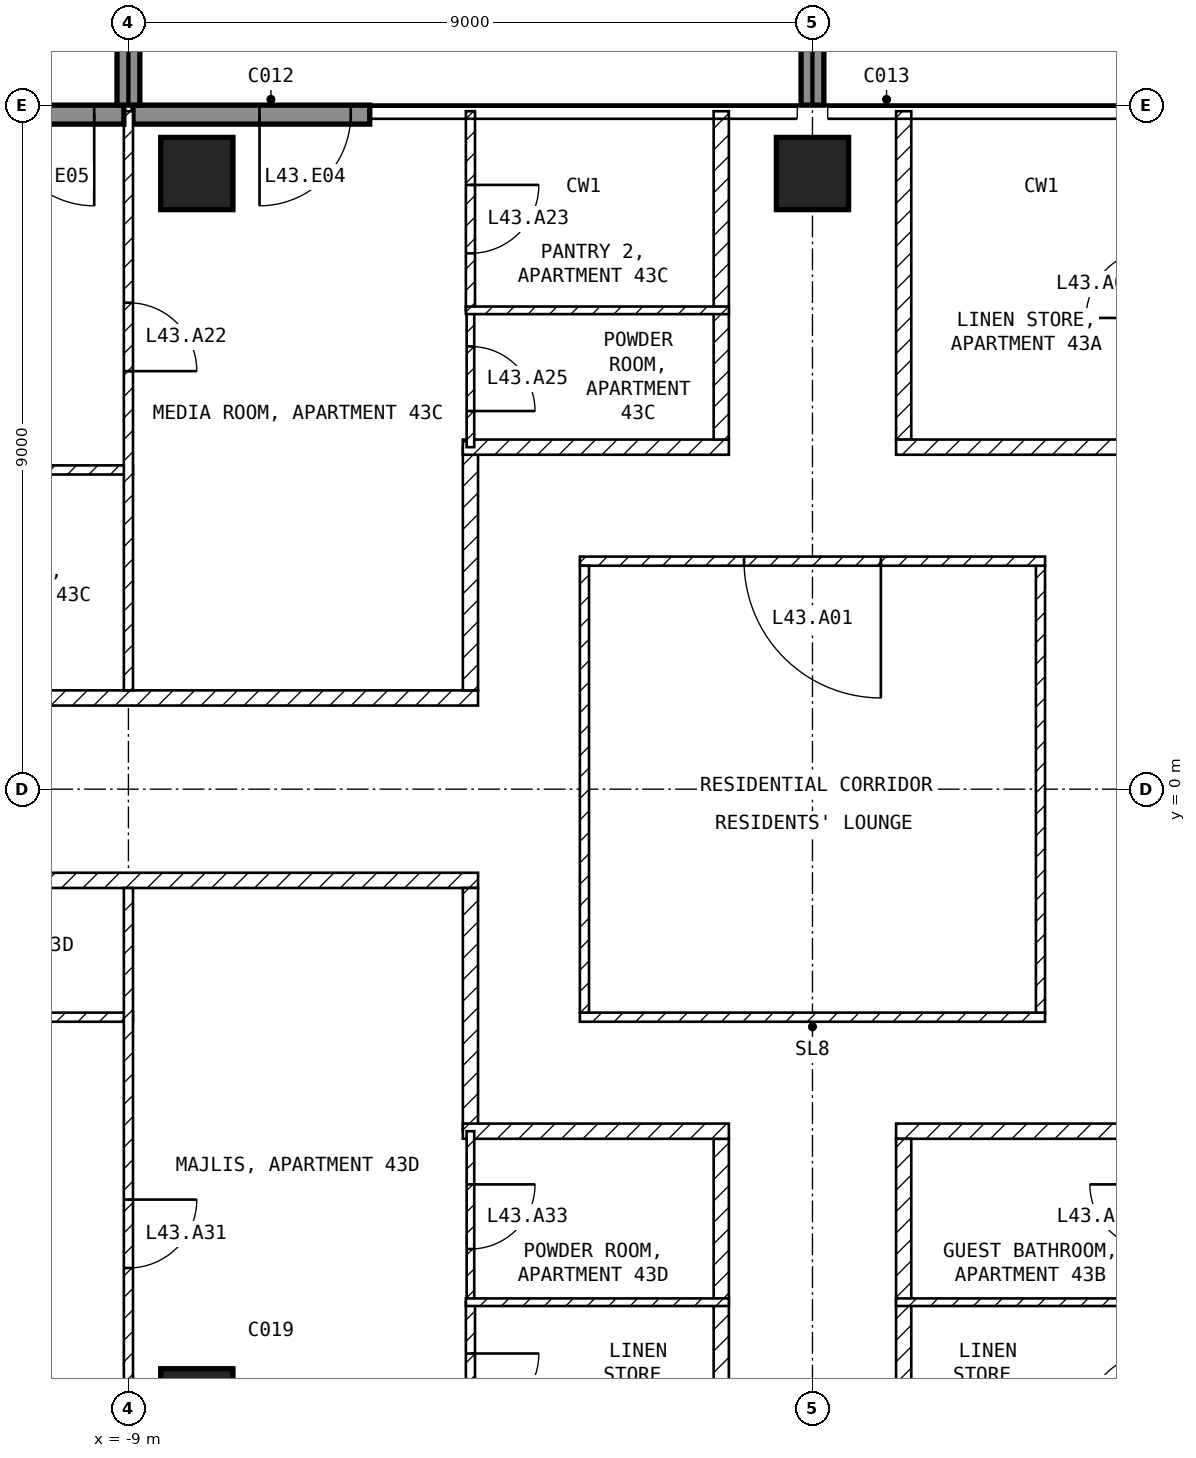
"""IFC4 building model, lengths in metres.
Left out: names, types, materials, properties, quantities, classifications, styles, units other than length and angle.
Written with IfcOpenShell. Run it as: python <this file> out.ifc"""

import sys

from ifc_helpers import new_model, si_unit, direction, frame, frame_2d, origin, origin_2d, place, context, subcontext, project, spatial, rectangle, extrude, element, fill, save


model = new_model("IFC4")
c1 = context("Model", 3, precision=1e-05, world=origin(), true_north=direction((0.0, 1.0)))
c2 = subcontext(c1, "Body", "Model", "MODEL_VIEW")
j1 = project(units=[si_unit("LENGTHUNIT", "METRE"), si_unit("PLANEANGLEUNIT", "RADIAN")], contexts=[c1])
p1 = place(None, origin())
s1 = spatial("IfcSite", under=j1, at=p1, CompositionType="ELEMENT")
p2 = place(p1, origin())
s2 = spatial("IfcBuilding", under=s1, at=p2, CompositionType="ELEMENT")
p3 = place(p2, frame((0.0, 0.0, 177.1)))
s3 = spatial("IfcBuildingStorey", under=s2, at=p3, CompositionType="ELEMENT", Elevation=177.1)
for number, where, z_axis, x_axis in (
    (1, (-8.1, -8.1, -0.25), (0.0, 0.0, 1.0), (1.0, 0.0, 0.0)),
    (2, (-8.1, 8.1, -0.25), (0.0, 0.0, 1.0), (1.0, 0.0, 0.0)),
    (3, (0.0, 8.1, -0.25), (0.0, 0.0, 1.0), (1.0, 0.0, 0.0)),
):
    element("IfcColumn", number, at=place(p3, frame(where, z_axis=z_axis, x_axis=x_axis)), inside=s3, PredefinedType="COLUMN", context=c2, shape_type="SweptSolid", body=[
        extrude(rectangle(XDim=0.95, YDim=0.95, at=origin_2d()), origin(), (0.0, 0.0, 1.0), 3.5),
    ])
p4 = place(p3, frame((-5.825, 8.875, 0.0), z_axis=(0.0, 0.0, 1.0), x_axis=(-1.0, 0.0, 0.0)))
e4 = element("IfcWall", 4, at=p4, inside=s3, PredefinedType="SOLIDWALL", context=c2, shape_type="SweptSolid", body=[
    extrude(rectangle(XDim=3.115, YDim=0.25, at=frame_2d((1.558, 0.0))), origin(), (0.0, 0.0, 1.0), 3.25),
])
p5 = place(p4, frame((0.25, 0.0, 0.0)))
e5 = element("IfcOpeningElement", 5, at=p5, cuts=e4, PredefinedType="OPENING", context=c2, shape_type="SweptSolid", body=[
    extrude(rectangle(XDim=1.2, YDim=2.4, at=frame_2d((0.6, 1.2))), frame((0.0, 0.135, 0.0), z_axis=(0.0, -1.0, 0.0), x_axis=(1.0, 0.0, 0.0)), (0.0, 0.0, 1.0), 0.27),
])
p6 = place(p3, frame((-9.06, 8.875, 0.0), z_axis=(0.0, 0.0, 1.0), x_axis=(-1.0, 0.0, 0.0)))
e6 = element("IfcWall", 6, at=p6, inside=s3, PredefinedType="SOLIDWALL", context=c2, shape_type="SweptSolid", body=[
    extrude(rectangle(XDim=1.84, YDim=0.25, at=frame_2d((0.92, 0.0))), origin(), (0.0, 0.0, 1.0), 3.25),
])
p7 = place(p6, frame((0.39, 0.0, 0.0)))
e7 = element("IfcOpeningElement", 7, at=p7, cuts=e6, PredefinedType="OPENING", context=c2, shape_type="SweptSolid", body=[
    extrude(rectangle(XDim=1.2, YDim=2.4, at=frame_2d((0.6, 1.2))), frame((0.0, 0.135, 0.0), z_axis=(0.0, -1.0, 0.0), x_axis=(1.0, 0.0, 0.0)), (0.0, 0.0, 1.0), 0.27),
])
for number, where, z_axis, x_axis in (
    (8, (-9.0, 9.0, 0.0), (0.0, 0.0, 1.0), (0.0, 1.0, 0.0)),
    (9, (0.0, 9.0, 0.0), (0.0, 0.0, 1.0), (0.0, 1.0, 0.0)),
):
    element("IfcWall", number, at=place(p3, frame(where, z_axis=z_axis, x_axis=x_axis)), inside=s3, PredefinedType="SOLIDWALL", context=c2, shape_type="SweptSolid", body=[
        extrude(rectangle(XDim=2.7, YDim=0.3, at=frame_2d((1.35, 0.0))), origin(), (0.0, 0.0, 1.0), 3.25),
    ])
p8 = place(p3, frame((-3.06, -3.0, 0.0), z_axis=(0.0, 0.0, 1.0), x_axis=(1.0, 0.0, 0.0)))
e10 = element("IfcWall", 10, at=p8, inside=s3, PredefinedType="PARTITIONING", context=c2, shape_type="SweptSolid", body=[
    extrude(rectangle(XDim=6.12, YDim=0.12, at=frame_2d((3.06, 0.0))), origin(), (0.0, 0.0, 1.0), 3.25),
])
p9 = place(p3, frame((3.0, -2.94, 0.0), z_axis=(0.0, 0.0, 1.0), x_axis=(0.0, 1.0, 0.0)))
e11 = element("IfcWall", 11, at=p9, inside=s3, PredefinedType="PARTITIONING", context=c2, shape_type="SweptSolid", body=[
    extrude(rectangle(XDim=5.88, YDim=0.12, at=frame_2d((2.94, 0.0))), origin(), (0.0, 0.0, 1.0), 3.25),
])
p10 = place(p3, frame((3.06, 3.0, 0.0), z_axis=(0.0, 0.0, 1.0), x_axis=(-1.0, 0.0, 0.0)))
e12 = element("IfcWall", 12, at=p10, inside=s3, PredefinedType="PARTITIONING", context=c2, shape_type="SweptSolid", body=[
    extrude(rectangle(XDim=6.12, YDim=0.12, at=frame_2d((3.06, 0.0))), origin(), (0.0, 0.0, 1.0), 3.25),
])
p11 = place(p10, frame((2.16, 0.0, 0.0)))
e13 = element("IfcOpeningElement", 13, at=p11, cuts=e12, PredefinedType="OPENING", context=c2, shape_type="SweptSolid", body=[
    extrude(rectangle(XDim=1.8, YDim=2.1, at=frame_2d((0.9, 1.05))), frame((0.0, 0.07, 0.0), z_axis=(0.0, -1.0, 0.0), x_axis=(1.0, 0.0, 0.0)), (0.0, 0.0, 1.0), 0.14),
])
p12 = place(p3, frame((-3.0, 2.94, 0.0), z_axis=(0.0, 0.0, 1.0), x_axis=(0.0, -1.0, 0.0)))
e14 = element("IfcWall", 14, at=p12, inside=s3, PredefinedType="PARTITIONING", context=c2, shape_type="SweptSolid", body=[
    extrude(rectangle(XDim=5.88, YDim=0.12, at=frame_2d((2.94, 0.0))), origin(), (0.0, 0.0, 1.0), 3.25),
])
p13 = place(p3, frame((1.2, 8.92, 0.0), z_axis=(0.0, 0.0, 1.0), x_axis=(0.0, -1.0, 0.0)))
e15 = element("IfcWall", 15, at=p13, inside=s3, PredefinedType="PARTITIONING", context=c2, shape_type="SweptSolid", body=[
    extrude(rectangle(XDim=4.32, YDim=0.2, at=frame_2d((2.16, 0.0))), origin(), (0.0, 0.0, 1.0), 3.25),
])
p14 = place(p3, frame((1.1, 4.5, 0.0), z_axis=(0.0, 0.0, 1.0), x_axis=(1.0, 0.0, 0.0)))
e16 = element("IfcWall", 16, at=p14, inside=s3, PredefinedType="PARTITIONING", context=c2, shape_type="SweptSolid", body=[
    extrude(rectangle(XDim=3.46, YDim=0.2, at=frame_2d((1.73, 0.0))), origin(), (0.0, 0.0, 1.0), 3.25),
])
p15 = place(p3, frame((4.6, -4.5, 0.0), z_axis=(0.0, 0.0, 1.0), x_axis=(-1.0, 0.0, 0.0)))
e17 = element("IfcWall", 17, at=p15, inside=s3, PredefinedType="PARTITIONING", context=c2, shape_type="SweptSolid", body=[
    extrude(rectangle(XDim=3.5, YDim=0.2, at=frame_2d((1.75, 0.0))), origin(), (0.0, 0.0, 1.0), 3.25),
])
p16 = place(p3, frame((1.2, -4.6, 0.0), z_axis=(0.0, 0.0, 1.0), x_axis=(0.0, -1.0, 0.0)))
e18 = element("IfcWall", 18, at=p16, inside=s3, PredefinedType="PARTITIONING", context=c2, shape_type="SweptSolid", body=[
    extrude(rectangle(XDim=4.3, YDim=0.2, at=frame_2d((2.15, 0.0))), origin(), (0.0, 0.0, 1.0), 3.25),
])
p17 = place(p3, frame((-21.6, 1.2, 0.0), z_axis=(0.0, 0.0, 1.0), x_axis=(1.0, 0.0, 0.0)))
e19 = element("IfcWall", 19, at=p17, inside=s3, PredefinedType="PARTITIONING", context=c2, shape_type="SweptSolid", body=[
    extrude(rectangle(XDim=17.2, YDim=0.2, at=frame_2d((8.6, 0.0))), origin(), (0.0, 0.0, 1.0), 3.25),
])
p18 = place(p17, frame((7.75, 0.0, 0.0)))
e20 = element("IfcOpeningElement", 20, at=p18, cuts=e19, PredefinedType="OPENING", context=c2, shape_type="SweptSolid", body=[
    extrude(rectangle(XDim=1.0, YDim=2.1, at=frame_2d((0.5, 1.05))), frame((0.0, 0.11, 0.0), z_axis=(0.0, -1.0, 0.0), x_axis=(1.0, 0.0, 0.0)), (0.0, 0.0, 1.0), 0.22),
])
p19 = place(p3, frame((-4.5, 1.3, 0.0), z_axis=(0.0, 0.0, 1.0), x_axis=(0.0, 1.0, 0.0)))
e21 = element("IfcWall", 21, at=p19, inside=s3, PredefinedType="PARTITIONING", context=c2, shape_type="SweptSolid", body=[
    extrude(rectangle(XDim=3.2, YDim=0.2, at=frame_2d((1.6, 0.0))), origin(), (0.0, 0.0, 1.0), 3.25),
])
p20 = place(p3, frame((-4.6, 4.5, 0.0), z_axis=(0.0, 0.0, 1.0), x_axis=(1.0, 0.0, 0.0)))
e22 = element("IfcWall", 22, at=p20, inside=s3, PredefinedType="PARTITIONING", context=c2, shape_type="SweptSolid", body=[
    extrude(rectangle(XDim=3.5, YDim=0.2, at=frame_2d((1.75, 0.0))), origin(), (0.0, 0.0, 1.0), 3.25),
])
p21 = place(p3, frame((-1.2, 4.6, 0.0), z_axis=(0.0, 0.0, 1.0), x_axis=(0.0, 1.0, 0.0)))
e23 = element("IfcWall", 23, at=p21, inside=s3, PredefinedType="PARTITIONING", context=c2, shape_type="SweptSolid", body=[
    extrude(rectangle(XDim=4.32, YDim=0.2, at=frame_2d((2.16, 0.0))), origin(), (0.0, 0.0, 1.0), 3.25),
])
p22 = place(p3, frame((-4.4, -1.2, 0.0), z_axis=(0.0, 0.0, 1.0), x_axis=(-1.0, 0.0, 0.0)))
e24 = element("IfcWall", 24, at=p22, inside=s3, PredefinedType="PARTITIONING", context=c2, shape_type="SweptSolid", body=[
    extrude(rectangle(XDim=17.2, YDim=0.2, at=frame_2d((8.6, 0.0))), origin(), (0.0, 0.0, 1.0), 3.25),
])
p23 = place(p22, frame((12.35, 0.0, 0.0)))
e25 = element("IfcOpeningElement", 25, at=p23, cuts=e24, PredefinedType="OPENING", context=c2, shape_type="SweptSolid", body=[
    extrude(rectangle(XDim=1.0, YDim=2.1, at=frame_2d((0.5, 1.05))), frame((0.0, 0.11, 0.0), z_axis=(0.0, -1.0, 0.0), x_axis=(1.0, 0.0, 0.0)), (0.0, 0.0, 1.0), 0.22),
])
p24 = place(p3, frame((-4.5, -4.5, 0.0), z_axis=(0.0, 0.0, 1.0), x_axis=(0.0, 1.0, 0.0)))
e26 = element("IfcWall", 26, at=p24, inside=s3, PredefinedType="PARTITIONING", context=c2, shape_type="SweptSolid", body=[
    extrude(rectangle(XDim=3.2, YDim=0.2, at=frame_2d((1.6, 0.0))), origin(), (0.0, 0.0, 1.0), 3.25),
])
p25 = place(p3, frame((-1.2, -8.9, 0.0), z_axis=(0.0, 0.0, 1.0), x_axis=(0.0, 1.0, 0.0)))
e27 = element("IfcWall", 27, at=p25, inside=s3, PredefinedType="PARTITIONING", context=c2, shape_type="SweptSolid", body=[
    extrude(rectangle(XDim=4.3, YDim=0.2, at=frame_2d((2.15, 0.0))), origin(), (0.0, 0.0, 1.0), 3.25),
])
p26 = place(p3, frame((-1.1, -4.5, 0.0), z_axis=(0.0, 0.0, 1.0), x_axis=(-1.0, 0.0, 0.0)))
e28 = element("IfcWall", 28, at=p26, inside=s3, PredefinedType="PARTITIONING", context=c2, shape_type="SweptSolid", body=[
    extrude(rectangle(XDim=3.5, YDim=0.2, at=frame_2d((1.75, 0.0))), origin(), (0.0, 0.0, 1.0), 3.25),
])
p27 = place(p3, frame((4.56, -6.75, 0.0), z_axis=(0.0, 0.0, 1.0), x_axis=(-1.0, 0.0, 0.0)))
e29 = element("IfcWall", 29, at=p27, inside=s3, PredefinedType="PARTITIONING", context=c2, shape_type="SweptSolid", body=[
    extrude(rectangle(XDim=3.46, YDim=0.1, at=frame_2d((1.73, 0.0))), origin(), (0.0, 0.0, 1.0), 3.25),
])
p28 = place(p3, frame((-18.0, 4.2, 0.0), z_axis=(0.0, 0.0, 1.0), x_axis=(1.0, 0.0, 0.0)))
e30 = element("IfcWall", 30, at=p28, inside=s3, PredefinedType="PARTITIONING", context=c2, shape_type="SweptSolid", body=[
    extrude(rectangle(XDim=9.06, YDim=0.12, at=frame_2d((4.53, 0.0))), origin(), (0.0, 0.0, 1.0), 3.25),
])
p29 = place(p28, frame((4.2, 0.0, 0.0)))
e31 = element("IfcOpeningElement", 31, at=p29, cuts=e30, PredefinedType="OPENING", context=c2, shape_type="SweptSolid", body=[
    extrude(rectangle(XDim=0.9, YDim=2.1, at=frame_2d((0.45, 1.05))), frame((0.0, 0.07, 0.0), z_axis=(0.0, -1.0, 0.0), x_axis=(1.0, 0.0, 0.0)), (0.0, 0.0, 1.0), 0.14),
])
p30 = place(p3, frame((-9.0, 8.92, 0.0), z_axis=(0.0, 0.0, 1.0), x_axis=(0.0, -1.0, 0.0)))
e32 = element("IfcWall", 32, at=p30, inside=s3, PredefinedType="PARTITIONING", context=c2, shape_type="SweptSolid", body=[
    extrude(rectangle(XDim=7.62, YDim=0.12, at=frame_2d((3.81, 0.0))), origin(), (0.0, 0.0, 1.0), 3.25),
])
p31 = place(p30, frame((2.52, 0.0, 0.0)))
e33 = element("IfcOpeningElement", 33, at=p31, cuts=e32, PredefinedType="OPENING", context=c2, shape_type="SweptSolid", body=[
    extrude(rectangle(XDim=0.9, YDim=2.1, at=frame_2d((0.45, 1.05))), frame((0.0, 0.07, 0.0), z_axis=(0.0, -1.0, 0.0), x_axis=(1.0, 0.0, 0.0)), (0.0, 0.0, 1.0), 0.14),
])
p32 = place(p3, frame((-4.5, 6.3, 0.0), z_axis=(0.0, 0.0, 1.0), x_axis=(0.0, -1.0, 0.0)))
e34 = element("IfcWall", 34, at=p32, inside=s3, PredefinedType="PARTITIONING", context=c2, shape_type="SweptSolid", body=[
    extrude(rectangle(XDim=1.8, YDim=0.1, at=frame_2d((0.9, 0.0))), origin(), (0.0, 0.0, 1.0), 3.25),
])
p33 = place(p32, frame((0.475, 0.0, 0.0)))
e35 = element("IfcOpeningElement", 35, at=p33, cuts=e34, PredefinedType="OPENING", context=c2, shape_type="SweptSolid", body=[
    extrude(rectangle(XDim=0.85, YDim=2.1, at=frame_2d((0.425, 1.05))), frame((0.0, 0.06, 0.0), z_axis=(0.0, -1.0, 0.0), x_axis=(1.0, 0.0, 0.0)), (0.0, 0.0, 1.0), 0.12),
])
p34 = place(p3, frame((-4.5, 8.92, 0.0), z_axis=(0.0, 0.0, 1.0), x_axis=(0.0, -1.0, 0.0)))
e36 = element("IfcWall", 36, at=p34, inside=s3, PredefinedType="PARTITIONING", context=c2, shape_type="SweptSolid", body=[
    extrude(rectangle(XDim=2.62, YDim=0.12, at=frame_2d((1.31, 0.0))), origin(), (0.0, 0.0, 1.0), 3.25),
])
p35 = place(p34, frame((0.97, 0.0, 0.0)))
e37 = element("IfcOpeningElement", 37, at=p35, cuts=e36, PredefinedType="OPENING", context=c2, shape_type="SweptSolid", body=[
    extrude(rectangle(XDim=0.9, YDim=2.1, at=frame_2d((0.45, 1.05))), frame((0.0, 0.07, 0.0), z_axis=(0.0, -1.0, 0.0), x_axis=(1.0, 0.0, 0.0)), (0.0, 0.0, 1.0), 0.14),
])
p36 = place(p3, frame((-4.56, 6.3, 0.0), z_axis=(0.0, 0.0, 1.0), x_axis=(1.0, 0.0, 0.0)))
e38 = element("IfcWall", 38, at=p36, inside=s3, PredefinedType="PARTITIONING", context=c2, shape_type="SweptSolid", body=[
    extrude(rectangle(XDim=3.46, YDim=0.1, at=frame_2d((1.73, 0.0))), origin(), (0.0, 0.0, 1.0), 3.25),
])
p37 = place(p3, frame((-8.94, -3.0, 0.0), z_axis=(0.0, 0.0, 1.0), x_axis=(-1.0, 0.0, 0.0)))
e39 = element("IfcWall", 39, at=p37, inside=s3, PredefinedType="PARTITIONING", context=c2, shape_type="SweptSolid", body=[
    extrude(rectangle(XDim=9.51, YDim=0.12, at=frame_2d((4.755, 0.0))), origin(), (0.0, 0.0, 1.0), 3.25),
])
p38 = place(p37, frame((2.01, 0.0, 0.0)))
e40 = element("IfcOpeningElement", 40, at=p38, cuts=e39, PredefinedType="OPENING", context=c2, shape_type="SweptSolid", body=[
    extrude(rectangle(XDim=0.9, YDim=2.1, at=frame_2d((0.45, 1.05))), frame((0.0, 0.07, 0.0), z_axis=(0.0, -1.0, 0.0), x_axis=(1.0, 0.0, 0.0)), (0.0, 0.0, 1.0), 0.14),
])
p39 = place(p37, frame((7.635, 0.0, 0.0)))
e41 = element("IfcOpeningElement", 41, at=p39, cuts=e39, PredefinedType="OPENING", context=c2, shape_type="SweptSolid", body=[
    extrude(rectangle(XDim=0.9, YDim=2.1, at=frame_2d((0.45, 1.05))), frame((0.0, 0.07, 0.0), z_axis=(0.0, -1.0, 0.0), x_axis=(1.0, 0.0, 0.0)), (0.0, 0.0, 1.0), 0.14),
])
p40 = place(p3, frame((-9.0, -1.3, 0.0), z_axis=(0.0, 0.0, 1.0), x_axis=(0.0, -1.0, 0.0)))
e42 = element("IfcWall", 42, at=p40, inside=s3, PredefinedType="PARTITIONING", context=c2, shape_type="SweptSolid", body=[
    extrude(rectangle(XDim=7.62, YDim=0.12, at=frame_2d((3.81, 0.0))), origin(), (0.0, 0.0, 1.0), 3.25),
])
p41 = place(p40, frame((4.1, 0.0, 0.0)))
e43 = element("IfcOpeningElement", 43, at=p41, cuts=e42, PredefinedType="OPENING", context=c2, shape_type="SweptSolid", body=[
    extrude(rectangle(XDim=0.9, YDim=2.1, at=frame_2d((0.45, 1.05))), frame((0.0, 0.07, 0.0), z_axis=(0.0, -1.0, 0.0), x_axis=(1.0, 0.0, 0.0)), (0.0, 0.0, 1.0), 0.14),
])
p42 = place(p3, frame((-4.5, -4.5, 0.0), z_axis=(0.0, 0.0, 1.0), x_axis=(0.0, -1.0, 0.0)))
e44 = element("IfcWall", 44, at=p42, inside=s3, PredefinedType="PARTITIONING", context=c2, shape_type="SweptSolid", body=[
    extrude(rectangle(XDim=2.25, YDim=0.1, at=frame_2d((1.125, 0.0))), origin(), (0.0, 0.0, 1.0), 3.25),
])
p43 = place(p42, frame((0.7, 0.0, 0.0)))
e45 = element("IfcOpeningElement", 45, at=p43, cuts=e44, PredefinedType="OPENING", context=c2, shape_type="SweptSolid", body=[
    extrude(rectangle(XDim=0.85, YDim=2.1, at=frame_2d((0.425, 1.05))), frame((0.0, 0.06, 0.0), z_axis=(0.0, -1.0, 0.0), x_axis=(1.0, 0.0, 0.0)), (0.0, 0.0, 1.0), 0.12),
])
p44 = place(p3, frame((-4.5, -6.75, 0.0), z_axis=(0.0, 0.0, 1.0), x_axis=(0.0, -1.0, 0.0)))
e46 = element("IfcWall", 46, at=p44, inside=s3, PredefinedType="PARTITIONING", context=c2, shape_type="SweptSolid", body=[
    extrude(rectangle(XDim=2.25, YDim=0.12, at=frame_2d((1.125, 0.0))), origin(), (0.0, 0.0, 1.0), 3.25),
])
p45 = place(p44, frame((0.675, 0.0, 0.0)))
e47 = element("IfcOpeningElement", 47, at=p45, cuts=e46, PredefinedType="OPENING", context=c2, shape_type="SweptSolid", body=[
    extrude(rectangle(XDim=0.9, YDim=2.1, at=frame_2d((0.45, 1.05))), frame((0.0, 0.07, 0.0), z_axis=(0.0, -1.0, 0.0), x_axis=(1.0, 0.0, 0.0)), (0.0, 0.0, 1.0), 0.14),
])
p46 = place(p3, frame((-1.1, -6.75, 0.0), z_axis=(0.0, 0.0, 1.0), x_axis=(-1.0, 0.0, 0.0)))
e48 = element("IfcWall", 48, at=p46, inside=s3, PredefinedType="PARTITIONING", context=c2, shape_type="SweptSolid", body=[
    extrude(rectangle(XDim=3.46, YDim=0.1, at=frame_2d((1.73, 0.0))), origin(), (0.0, 0.0, 1.0), 3.25),
])
p47 = place(p5, origin())
e49 = element("IfcDoor", 49, at=p47, inside=s3, OperationType="SINGLE_SWING_RIGHT", PredefinedType="DOOR", context=c2, shape_type="SweptSolid", body=[
    extrude(rectangle(XDim=1.2, YDim=2.4, at=frame_2d((0.6, 1.2))), frame((0.0, 0.025, 0.0), z_axis=(0.0, -1.0, 0.0), x_axis=(1.0, 0.0, 0.0)), (0.0, 0.0, 1.0), 0.05),
])
fill(e5, e49)
p48 = place(p7, origin())
e50 = element("IfcDoor", 50, at=p48, inside=s3, OperationType="SINGLE_SWING_LEFT", PredefinedType="DOOR", context=c2, shape_type="SweptSolid", body=[
    extrude(rectangle(XDim=1.2, YDim=2.4, at=frame_2d((0.6, 1.2))), frame((0.0, 0.025, 0.0), z_axis=(0.0, -1.0, 0.0), x_axis=(1.0, 0.0, 0.0)), (0.0, 0.0, 1.0), 0.05),
])
fill(e7, e50)
p49 = place(p11, origin())
e51 = element("IfcDoor", 51, at=p49, inside=s3, OperationType="SINGLE_SWING_LEFT", PredefinedType="DOOR", context=c2, shape_type="SweptSolid", body=[
    extrude(rectangle(XDim=1.8, YDim=2.1, at=frame_2d((0.9, 1.05))), frame((0.0, 0.025, 0.0), z_axis=(0.0, -1.0, 0.0), x_axis=(1.0, 0.0, 0.0)), (0.0, 0.0, 1.0), 0.05),
])
fill(e13, e51)
p50 = place(p31, origin())
e52 = element("IfcDoor", 52, at=p50, inside=s3, OperationType="SINGLE_SWING_RIGHT", PredefinedType="DOOR", context=c2, shape_type="SweptSolid", body=[
    extrude(rectangle(XDim=0.9, YDim=2.1, at=frame_2d((0.45, 1.05))), frame((0.0, 0.025, 0.0), z_axis=(0.0, -1.0, 0.0), x_axis=(1.0, 0.0, 0.0)), (0.0, 0.0, 1.0), 0.05),
])
fill(e33, e52)
p51 = place(p35, origin())
e53 = element("IfcDoor", 53, at=p51, inside=s3, OperationType="SINGLE_SWING_LEFT", PredefinedType="DOOR", context=c2, shape_type="SweptSolid", body=[
    extrude(rectangle(XDim=0.9, YDim=2.1, at=frame_2d((0.45, 1.05))), frame((0.0, 0.025, 0.0), z_axis=(0.0, -1.0, 0.0), x_axis=(1.0, 0.0, 0.0)), (0.0, 0.0, 1.0), 0.05),
])
fill(e37, e53)
p52 = place(p33, origin())
e54 = element("IfcDoor", 54, at=p52, inside=s3, OperationType="SINGLE_SWING_RIGHT", PredefinedType="DOOR", context=c2, shape_type="SweptSolid", body=[
    extrude(rectangle(XDim=0.85, YDim=2.1, at=frame_2d((0.425, 1.05))), frame((0.0, 0.025, 0.0), z_axis=(0.0, -1.0, 0.0), x_axis=(1.0, 0.0, 0.0)), (0.0, 0.0, 1.0), 0.05),
])
fill(e35, e54)
p53 = place(p45, origin())
e55 = element("IfcDoor", 55, at=p53, inside=s3, OperationType="SINGLE_SWING_LEFT", PredefinedType="DOOR", context=c2, shape_type="SweptSolid", body=[
    extrude(rectangle(XDim=0.9, YDim=2.1, at=frame_2d((0.45, 1.05))), frame((0.0, 0.025, 0.0), z_axis=(0.0, -1.0, 0.0), x_axis=(1.0, 0.0, 0.0)), (0.0, 0.0, 1.0), 0.05),
])
fill(e47, e55)
p54 = place(p41, origin())
e56 = element("IfcDoor", 56, at=p54, inside=s3, OperationType="SINGLE_SWING_LEFT", PredefinedType="DOOR", context=c2, shape_type="SweptSolid", body=[
    extrude(rectangle(XDim=0.9, YDim=2.1, at=frame_2d((0.45, 1.05))), frame((0.0, 0.025, 0.0), z_axis=(0.0, -1.0, 0.0), x_axis=(1.0, 0.0, 0.0)), (0.0, 0.0, 1.0), 0.05),
])
fill(e43, e56)
p55 = place(p43, origin())
e57 = element("IfcDoor", 57, at=p55, inside=s3, OperationType="SINGLE_SWING_LEFT", PredefinedType="DOOR", context=c2, shape_type="SweptSolid", body=[
    extrude(rectangle(XDim=0.85, YDim=2.1, at=frame_2d((0.425, 1.05))), frame((0.0, 0.025, 0.0), z_axis=(0.0, -1.0, 0.0), x_axis=(1.0, 0.0, 0.0)), (0.0, 0.0, 1.0), 0.05),
])
fill(e45, e57)
save(model, sys.argv[1])
